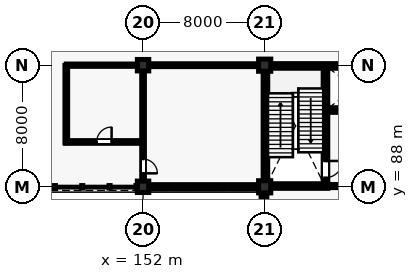
"""IFC4 building model, lengths in metres.
Left out: names, types, materials, properties, quantities, classifications, styles, units other than length and angle.
Written with IfcOpenShell. Run it as: python <this file> out.ifc"""

import sys

from ifc_helpers import new_model, si_unit, direction, frame, frame_2d, origin, origin_2d, place, context, subcontext, project, spatial, rectangle, extrude, element, fill, save


model = new_model("IFC4")
c1 = context("Model", 3, precision=1e-05, world=origin(), true_north=direction((0.0, 1.0)))
c2 = subcontext(c1, "Body", "Model", "MODEL_VIEW")
j1 = project(units=[si_unit("LENGTHUNIT", "METRE"), si_unit("PLANEANGLEUNIT", "RADIAN")], contexts=[c1])
p1 = place(None, origin())
s1 = spatial("IfcSite", under=j1, at=p1, CompositionType="ELEMENT")
p2 = place(p1, origin())
s2 = spatial("IfcBuilding", under=s1, at=p2, CompositionType="ELEMENT")
p3 = place(p2, origin())
s3 = spatial("IfcBuildingStorey", under=s2, at=p3, CompositionType="ELEMENT", Elevation=0.0)
for number, where, z_axis, x_axis in (
    (1, (152.0, 88.0, 0.0), (0.0, 0.0, 1.0), (1.0, 0.0, 0.0)),
    (2, (152.0, 96.0, 0.0), (0.0, 0.0, 1.0), (1.0, 0.0, 0.0)),
):
    element("IfcColumn", number, at=place(p3, frame(where, z_axis=z_axis, x_axis=x_axis)), inside=s3, PredefinedType="COLUMN", context=c2, shape_type="SweptSolid", body=[
        extrude(rectangle(XDim=0.75, YDim=0.75, at=origin_2d()), origin(), (0.0, 0.0, 1.0), 5.28),
    ])
for number, where, z_axis, x_axis in (
    (3, (160.0, 88.0, 0.0), (0.0, 0.0, 1.0), (1.0, 0.0, 0.0)),
    (4, (160.0, 96.0, 0.0), (0.0, 0.0, 1.0), (1.0, 0.0, 0.0)),
):
    element("IfcColumn", number, at=place(p3, frame(where, z_axis=z_axis, x_axis=x_axis)), inside=s3, PredefinedType="COLUMN", context=c2, shape_type="SweptSolid", body=[
        extrude(rectangle(XDim=0.8, YDim=0.8, at=origin_2d()), origin(), (0.0, 0.0, 1.0), 5.28),
    ])
p4 = place(p3, frame((152.36, 88.0, 0.0), z_axis=(0.0, 0.0, 1.0), x_axis=(1.0, 0.0, 0.0)))
e5 = element("IfcWall", 5, at=p4, inside=s3, PredefinedType="SOLIDWALL", context=c2, shape_type="SweptSolid", body=[
    extrude(rectangle(XDim=7.255, YDim=0.28, at=frame_2d((3.627, 0.0))), origin(), (0.0, 0.0, 1.0), 4.614),
])
p5 = place(p4, frame((2.702, 0.0, 0.9)))
e6 = element("IfcOpeningElement", 6, at=p5, cuts=e5, PredefinedType="OPENING", context=c2, shape_type="SweptSolid", body=[
    extrude(rectangle(XDim=1.85, YDim=2.65, at=frame_2d((0.925, 1.325))), frame((0.0, 0.15, 0.0), z_axis=(0.0, -1.0, 0.0), x_axis=(1.0, 0.0, 0.0)), (0.0, 0.0, 1.0), 0.3),
])
p6 = place(p3, frame((160.0, 80.335, 0.0), z_axis=(0.0, 0.0, 1.0), x_axis=(0.0, 1.0, 0.0)))
e7 = element("IfcWall", 7, at=p6, inside=s3, PredefinedType="SOLIDWALL", context=c2, shape_type="SweptSolid", body=[
    extrude(rectangle(XDim=7.28, YDim=0.28, at=frame_2d((3.64, 0.0))), origin(), (0.0, 0.0, 1.0), 4.619),
])
p7 = place(p6, frame((2.715, 0.0, 0.9)))
e8 = element("IfcOpeningElement", 8, at=p7, cuts=e7, PredefinedType="OPENING", context=c2, shape_type="SweptSolid", body=[
    extrude(rectangle(XDim=1.85, YDim=2.65, at=frame_2d((0.925, 1.325))), frame((0.0, 0.15, 0.0), z_axis=(0.0, -1.0, 0.0), x_axis=(1.0, 0.0, 0.0)), (0.0, 0.0, 1.0), 0.3),
])
for number, where, z_axis, x_axis in (
    (9, (160.05, 88.29, 0.0), (0.0, 0.0, 1.0), (0.0, 1.0, 0.0)),
    (10, (160.29, 95.95, 0.0), (0.0, 0.0, 1.0), (1.0, 0.0, 0.0)),
):
    element("IfcWall", number, at=place(p3, frame(where, z_axis=z_axis, x_axis=x_axis)), inside=s3, PredefinedType="SHEAR", context=c2, shape_type="SweptSolid", body=[
        extrude(rectangle(XDim=7.42, YDim=0.3, at=frame_2d((3.71, 0.0))), origin(), (0.0, 0.0, 1.0), 5.035),
    ])
p8 = place(p3, frame((160.29, 88.05, 0.0), z_axis=(0.0, 0.0, 1.0), x_axis=(1.0, 0.0, 0.0)))
e11 = element("IfcWall", 11, at=p8, inside=s3, PredefinedType="SHEAR", context=c2, shape_type="SweptSolid", body=[
    extrude(rectangle(XDim=3.86, YDim=0.3, at=frame_2d((1.93, 0.0))), origin(), (0.0, 0.0, 1.0), 5.035),
])
p9 = place(p3, frame((164.0, 88.05, 0.0), z_axis=(0.0, 0.0, 1.0), x_axis=(0.0, 1.0, 0.0)))
e12 = element("IfcWall", 12, at=p9, inside=s3, PredefinedType="SHEAR", context=c2, shape_type="SweptSolid", body=[
    extrude(rectangle(XDim=7.9, YDim=0.3, at=frame_2d((3.95, 0.0))), origin(), (0.0, 0.0, 1.0), 5.035),
])
p10 = place(p9, frame((0.55, 0.0, 0.0)))
e13 = element("IfcOpeningElement", 13, at=p10, cuts=e12, PredefinedType="OPENING", context=c2, shape_type="SweptSolid", body=[
    extrude(rectangle(XDim=1.1, YDim=2.15, at=frame_2d((0.55, 1.075))), frame((0.0, 0.16, 0.0), z_axis=(0.0, -1.0, 0.0), x_axis=(1.0, 0.0, 0.0)), (0.0, 0.0, 1.0), 0.32),
])
p11 = place(p3, frame((164.0, 93.05, 0.0), z_axis=(0.0, 0.0, 1.0), x_axis=(1.0, 0.0, 0.0)))
e14 = element("IfcWall", 14, at=p11, inside=s3, PredefinedType="SHEAR", context=c2, shape_type="SweptSolid", body=[
    extrude(rectangle(XDim=3.95, YDim=0.3, at=frame_2d((1.975, 0.0))), origin(), (0.0, 0.0, 1.0), 5.035),
])
p12 = place(p11, frame((1.375, 0.0, 0.0)))
e15 = element("IfcOpeningElement", 15, at=p12, cuts=e14, PredefinedType="OPENING", context=c2, shape_type="SweptSolid", body=[
    extrude(rectangle(XDim=1.2, YDim=2.2, at=frame_2d((0.6, 1.1))), frame((0.0, 0.16, 0.0), z_axis=(0.0, -1.0, 0.0), x_axis=(1.0, 0.0, 0.0)), (0.0, 0.0, 1.0), 0.32),
])
p13 = place(p3, frame((164.0, 88.05, 0.0), z_axis=(0.0, 0.0, 1.0), x_axis=(1.0, 0.0, 0.0)))
e16 = element("IfcWall", 16, at=p13, inside=s3, PredefinedType="PARTITIONING", context=c2, shape_type="SweptSolid", body=[
    extrude(rectangle(XDim=3.61, YDim=0.2, at=frame_2d((1.805, 0.0))), origin(), (0.0, 0.0, 1.0), 4.404),
])
p14 = place(p13, frame((1.205, 0.0, 0.0)))
e17 = element("IfcOpeningElement", 17, at=p14, cuts=e16, PredefinedType="OPENING", context=c2, shape_type="SweptSolid", body=[
    extrude(rectangle(XDim=1.2, YDim=2.15, at=frame_2d((0.6, 1.075))), frame((0.0, 0.11, 0.0), z_axis=(0.0, -1.0, 0.0), x_axis=(1.0, 0.0, 0.0)), (0.0, 0.0, 1.0), 0.22),
])
p15 = place(p3, frame((146.9, 90.95, 0.0), z_axis=(0.0, 0.0, 1.0), x_axis=(1.0, 0.0, 0.0)))
e18 = element("IfcWall", 18, at=p15, inside=s3, PredefinedType="PARTITIONING", context=c2, shape_type="SweptSolid", body=[
    extrude(rectangle(XDim=5.08, YDim=0.175, at=frame_2d((2.54, 0.0))), origin(), (0.0, 0.0, 1.0), 4.404),
])
p16 = place(p15, frame((2.05, 0.0, 0.0)))
e19 = element("IfcOpeningElement", 19, at=p16, cuts=e18, PredefinedType="OPENING", context=c2, shape_type="SweptSolid", body=[
    extrude(rectangle(XDim=0.98, YDim=2.15, at=frame_2d((0.49, 1.075))), frame((0.0, 0.097, 0.0), z_axis=(0.0, -1.0, 0.0), x_axis=(1.0, 0.0, 0.0)), (0.0, 0.0, 1.0), 0.195),
])
p17 = place(p3, frame((146.95, 90.9, 0.0), z_axis=(0.0, 0.0, 1.0), x_axis=(0.0, 1.0, 0.0)))
e20 = element("IfcWall", 20, at=p17, inside=s3, PredefinedType="PARTITIONING", context=c2, shape_type="SweptSolid", body=[
    extrude(rectangle(XDim=5.08, YDim=0.175, at=frame_2d((2.54, 0.0))), origin(), (0.0, 0.0, 1.0), 4.336),
])
p18 = place(p3, frame((146.95, 96.0, 0.0), z_axis=(0.0, 0.0, 1.0), x_axis=(1.0, 0.0, 0.0)))
e21 = element("IfcWall", 21, at=p18, inside=s3, PredefinedType="PARTITIONING", context=c2, shape_type="SweptSolid", body=[
    extrude(rectangle(XDim=4.665, YDim=0.15, at=frame_2d((2.333, 0.0))), origin(), (0.0, 0.0, 1.0), 4.336),
])
p19 = place(p3, frame((152.0, 88.365, 0.0), z_axis=(0.0, 0.0, 1.0), x_axis=(0.0, 1.0, 0.0)))
e22 = element("IfcWall", 22, at=p19, inside=s3, PredefinedType="PARTITIONING", context=c2, shape_type="SweptSolid", body=[
    extrude(rectangle(XDim=7.27, YDim=0.175, at=frame_2d((3.635, 0.0))), origin(), (0.0, 0.0, 1.0), 4.404),
])
p20 = place(p19, frame((0.52, 0.0, 0.0)))
e23 = element("IfcOpeningElement", 23, at=p20, cuts=e22, PredefinedType="OPENING", context=c2, shape_type="SweptSolid", body=[
    extrude(rectangle(XDim=0.94, YDim=2.12, at=frame_2d((0.47, 1.06))), frame((0.0, 0.097, 0.0), z_axis=(0.0, -1.0, 0.0), x_axis=(1.0, 0.0, 0.0)), (0.0, 0.0, 1.0), 0.195),
])
p21 = place(p3, frame((152.365, 96.0, 0.0), z_axis=(0.0, 0.0, 1.0), x_axis=(1.0, 0.0, 0.0)))
e24 = element("IfcWall", 24, at=p21, inside=s3, PredefinedType="PARTITIONING", context=c2, shape_type="SweptSolid", body=[
    extrude(rectangle(XDim=7.245, YDim=0.185, at=frame_2d((3.623, 0.0))), origin(), (0.0, 0.0, 1.0), 4.404),
])
p22 = place(p5, origin())
e25 = element("IfcWindow", 25, at=p22, inside=s3, PartitioningType="SINGLE_PANEL", PredefinedType="WINDOW", context=c2, shape_type="SweptSolid", body=[
    extrude(rectangle(XDim=1.85, YDim=2.65, at=frame_2d((0.925, 1.325))), frame((0.0, 0.03, 0.0), z_axis=(0.0, -1.0, 0.0), x_axis=(1.0, 0.0, 0.0)), (0.0, 0.0, 1.0), 0.06),
])
fill(e6, e25)
p23 = place(p10, frame((1.1, 0.0, 0.0), z_axis=(0.0, 0.0, 1.0), x_axis=(-1.0, 0.0, 0.0)))
e26 = element("IfcDoor", 26, at=p23, inside=s3, OperationType="SINGLE_SWING_RIGHT", PredefinedType="DOOR", context=c2, shape_type="SweptSolid", body=[
    extrude(rectangle(XDim=1.1, YDim=2.15, at=frame_2d((0.55, 1.075))), frame((0.0, 0.025, 0.0), z_axis=(0.0, -1.0, 0.0), x_axis=(1.0, 0.0, 0.0)), (0.0, 0.0, 1.0), 0.05),
])
fill(e13, e26)
p24 = place(p16, origin())
e27 = element("IfcDoor", 27, at=p24, inside=s3, OperationType="SINGLE_SWING_RIGHT", PredefinedType="DOOR", context=c2, shape_type="SweptSolid", body=[
    extrude(rectangle(XDim=0.98, YDim=2.15, at=frame_2d((0.49, 1.075))), frame((0.0, 0.025, 0.0), z_axis=(0.0, -1.0, 0.0), x_axis=(1.0, 0.0, 0.0)), (0.0, 0.0, 1.0), 0.05),
])
fill(e19, e27)
p25 = place(p20, frame((0.94, 0.0, 0.0), z_axis=(0.0, 0.0, 1.0), x_axis=(-1.0, 0.0, 0.0)))
e28 = element("IfcDoor", 28, at=p25, inside=s3, OperationType="SINGLE_SWING_LEFT", PredefinedType="DOOR", context=c2, shape_type="SweptSolid", body=[
    extrude(rectangle(XDim=0.94, YDim=2.12, at=frame_2d((0.47, 1.06))), frame((0.0, 0.025, 0.0), z_axis=(0.0, -1.0, 0.0), x_axis=(1.0, 0.0, 0.0)), (0.0, 0.0, 1.0), 0.05),
])
fill(e23, e28)
save(model, sys.argv[1])
